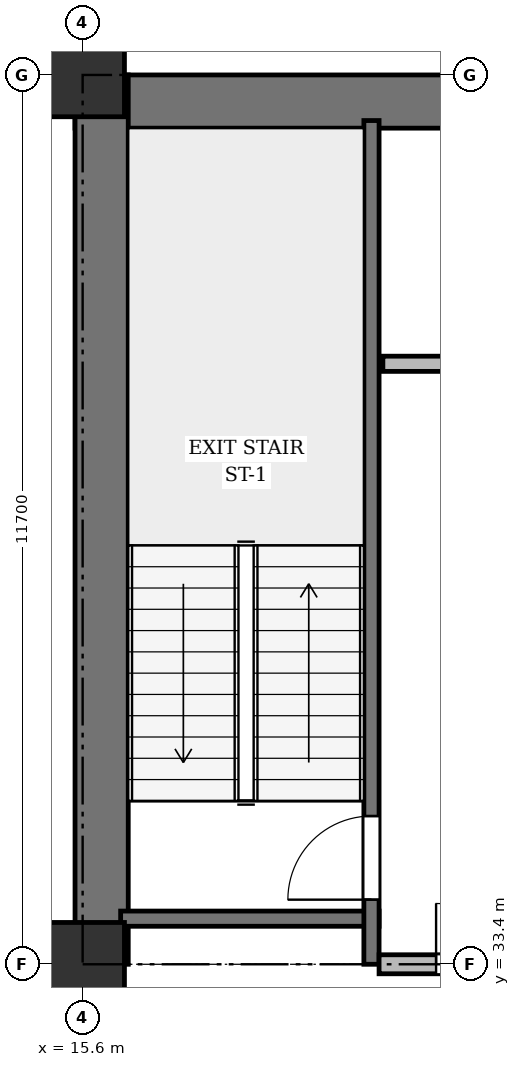
"""IFC4 building model, lengths in metres.
Left out: names, types, materials, properties, quantities, classifications, styles, units other than length and angle.
Written with IfcOpenShell. Run it as: python <this file> out.ifc"""

import sys

from ifc_helpers import new_model, si_unit, direction, frame, frame_2d, origin, origin_2d, place, context, subcontext, project, spatial, rectangle, extrude, source, transform, mapped, element, fill, save


model = new_model("IFC4")
c1 = context("Model", 3, precision=1e-05, world=origin(), true_north=direction((0.0, 1.0)))
c2 = subcontext(c1, "Body", "Model", "MODEL_VIEW")
j1 = project(units=[si_unit("LENGTHUNIT", "METRE"), si_unit("PLANEANGLEUNIT", "RADIAN")], contexts=[c1])
p1 = place(None, origin())
s1 = spatial("IfcSite", under=j1, at=p1, CompositionType="ELEMENT")
p2 = place(p1, origin())
s2 = spatial("IfcBuilding", under=s1, at=p2, CompositionType="ELEMENT")
p3 = place(p2, frame((0.0, 0.0, 9.7)))
s3 = spatial("IfcBuildingStorey", under=s2, at=p3, CompositionType="ELEMENT", Elevation=9.7)
m1 = source(origin(), c2, "Body", "SweptSolid", [
    extrude(rectangle(XDim=1.1, YDim=1.1, at=origin_2d()), origin(), (0.0, 0.0, 1.0), 4.5),
])
for number, where, z_axis, x_axis in (
    (1, (15.6, 33.4, 0.0), (0.0, 0.0, 1.0), (1.0, 0.0, 0.0)),
    (2, (15.6, 45.1, 0.0), (0.0, 0.0, 1.0), (1.0, 0.0, 0.0)),
):
    element("IfcColumn", number, at=place(p3, frame(where, z_axis=z_axis, x_axis=x_axis)), inside=s3, PredefinedType="COLUMN", context=c2, shape_type="MappedRepresentation", body=[
        mapped(m1, transform((0.0, 0.0, 0.0), x_axis=(1.0, 0.0, 0.0), y_axis=(0.0, 1.0, 0.0), z_axis=(0.0, 0.0, 1.0), scale=1.0)),
    ])
p4 = place(p3, frame((15.5, 44.75, 0.0), z_axis=(0.0, 0.0, 1.0), x_axis=(1.0, 0.0, 0.0)))
e3 = element("IfcWall", 3, at=p4, inside=s3, PredefinedType="SHEAR", context=c2, shape_type="SweptSolid", body=[
    extrude(rectangle(XDim=43.4, YDim=0.7, at=frame_2d((21.7, 0.0))), origin(), (0.0, 0.0, 1.0), 4.2),
])
p5 = place(p3, frame((15.85, 33.4, 0.0), z_axis=(0.0, 0.0, 1.0), x_axis=(0.0, 1.0, 0.0)))
e4 = element("IfcWall", 4, at=p5, inside=s3, PredefinedType="SHEAR", context=c2, shape_type="SweptSolid", body=[
    extrude(rectangle(XDim=11.7, YDim=0.7, at=frame_2d((5.85, 0.0))), origin(), (0.0, 0.0, 1.0), 4.2),
])
p6 = place(p3, frame((16.1, 34.0, 0.0), z_axis=(0.0, 0.0, 1.0), x_axis=(1.0, 0.0, 0.0)))
e5 = element("IfcWall", 5, at=p6, inside=s3, PredefinedType="SHEAR", context=c2, shape_type="SweptSolid", body=[
    extrude(rectangle(XDim=3.4, YDim=0.2, at=frame_2d((1.7, 0.0))), origin(), (0.0, 0.0, 1.0), 4.2),
])
p7 = place(p3, frame((19.4, 33.4, 0.0), z_axis=(0.0, 0.0, 1.0), x_axis=(0.0, 1.0, 0.0)))
e6 = element("IfcWall", 6, at=p7, inside=s3, PredefinedType="SHEAR", context=c2, shape_type="SweptSolid", body=[
    extrude(rectangle(XDim=11.1, YDim=0.2, at=frame_2d((5.55, 0.0))), origin(), (0.0, 0.0, 1.0), 4.2),
])
p8 = place(p7, frame((0.85, 0.0, 0.0)))
e7 = element("IfcOpeningElement", 7, at=p8, cuts=e6, PredefinedType="OPENING", context=c2, shape_type="SweptSolid", body=[
    extrude(rectangle(XDim=1.1, YDim=2.15, at=frame_2d((0.55, 1.075))), frame((0.0, 0.11, 0.0), z_axis=(0.0, -1.0, 0.0), x_axis=(1.0, 0.0, 0.0)), (0.0, 0.0, 1.0), 0.22),
])
p9 = place(p3, frame((19.55, 41.3, 0.0), z_axis=(0.0, 0.0, 1.0), x_axis=(1.0, 0.0, 0.0)))
e8 = element("IfcWall", 8, at=p9, inside=s3, PredefinedType="SOLIDWALL", context=c2, shape_type="SweptSolid", body=[
    extrude(rectangle(XDim=6.75, YDim=0.2, at=frame_2d((3.375, 0.0))), origin(), (0.0, 0.0, 1.0), 4.2),
])
p10 = place(p9, frame((1.7, 0.0, 0.0)))
e9 = element("IfcOpeningElement", 9, at=p10, cuts=e8, PredefinedType="OPENING", context=c2, shape_type="SweptSolid", body=[
    extrude(rectangle(XDim=1.1, YDim=2.15, at=frame_2d((0.55, 1.075))), frame((0.0, 0.11, 0.0), z_axis=(0.0, -1.0, 0.0), x_axis=(1.0, 0.0, 0.0)), (0.0, 0.0, 1.0), 0.22),
])
p11 = place(p9, frame((4.4, 0.0, 0.0)))
e10 = element("IfcOpeningElement", 10, at=p11, cuts=e8, PredefinedType="OPENING", context=c2, shape_type="SweptSolid", body=[
    extrude(rectangle(XDim=1.1, YDim=2.15, at=frame_2d((0.55, 1.075))), frame((0.0, 0.11, 0.0), z_axis=(0.0, -1.0, 0.0), x_axis=(1.0, 0.0, 0.0)), (0.0, 0.0, 1.0), 0.22),
])
p12 = place(p3, frame((19.5, 33.4, 0.0), z_axis=(0.0, 0.0, 1.0), x_axis=(1.0, 0.0, 0.0)))
e11 = element("IfcWall", 11, at=p12, inside=s3, PredefinedType="PARTITIONING", context=c2, shape_type="SweptSolid", body=[
    extrude(rectangle(XDim=6.8, YDim=0.25, at=frame_2d((3.4, 0.0))), origin(), (0.0, 0.0, 1.0), 3.1),
])
p13 = place(p12, frame((0.75, 0.0, 0.0)))
e12 = element("IfcOpeningElement", 12, at=p13, cuts=e11, PredefinedType="OPENING", context=c2, shape_type="SweptSolid", body=[
    extrude(rectangle(XDim=1.6, YDim=2.2, at=frame_2d((0.8, 1.1))), frame((0.0, 0.135, 0.0), z_axis=(0.0, -1.0, 0.0), x_axis=(1.0, 0.0, 0.0)), (0.0, 0.0, 1.0), 0.27),
])
p14 = place(p3, frame((-1.75, 33.4, 0.0), z_axis=(0.0, 0.0, 1.0), x_axis=(1.0, 0.0, 0.0)))
e13 = element("IfcWall", 13, at=p14, inside=s3, PredefinedType="PARTITIONING", context=c2, shape_type="SweptSolid", body=[
    extrude(rectangle(XDim=17.55, YDim=0.15, at=frame_2d((8.775, 0.0))), origin(), (0.0, 0.0, 1.0), 3.1),
])
p15 = place(p14, frame((11.049, 0.0, 0.0)))
e14 = element("IfcOpeningElement", 14, at=p15, cuts=e13, PredefinedType="OPENING", context=c2, shape_type="SweptSolid", body=[
    extrude(rectangle(XDim=1.6, YDim=2.2, at=frame_2d((0.8, 1.1))), frame((0.0, 0.085, 0.0), z_axis=(0.0, -1.0, 0.0), x_axis=(1.0, 0.0, 0.0)), (0.0, 0.0, 1.0), 0.17),
])
m2 = source(origin(), c2, "Body", "SweptSolid", [
    extrude(rectangle(XDim=1.1, YDim=2.15, at=frame_2d((0.55, 1.075))), frame((0.0, 0.025, 0.0), z_axis=(0.0, -1.0, 0.0), x_axis=(1.0, 0.0, 0.0)), (0.0, 0.0, 1.0), 0.05),
])
p16 = place(p8, origin())
e15 = element("IfcDoor", 15, at=p16, inside=s3, OperationType="SINGLE_SWING_LEFT", PredefinedType="DOOR", context=c2, shape_type="MappedRepresentation", body=[
    mapped(m2, transform((0.0, 0.0, 0.0), x_axis=(1.0, 0.0, 0.0), y_axis=(0.0, 1.0, 0.0), z_axis=(0.0, 0.0, 1.0), scale=1.0)),
])
fill(e7, e15)
m3 = source(origin(), c2, "Body", "SweptSolid", [
    extrude(rectangle(XDim=1.6, YDim=2.2, at=frame_2d((0.8, 1.1))), frame((0.0, 0.025, 0.0), z_axis=(0.0, -1.0, 0.0), x_axis=(1.0, 0.0, 0.0)), (0.0, 0.0, 1.0), 0.05),
])
p17 = place(p13, origin())
e16 = element("IfcDoor", 16, at=p17, inside=s3, OperationType="DOUBLE_DOOR_SINGLE_SWING", PredefinedType="DOOR", context=c2, shape_type="MappedRepresentation", body=[
    mapped(m3, transform((0.0, 0.0, 0.0), x_axis=(1.0, 0.0, 0.0), y_axis=(0.0, 1.0, 0.0), z_axis=(0.0, 0.0, 1.0), scale=1.0)),
])
fill(e12, e16)
save(model, sys.argv[1])
